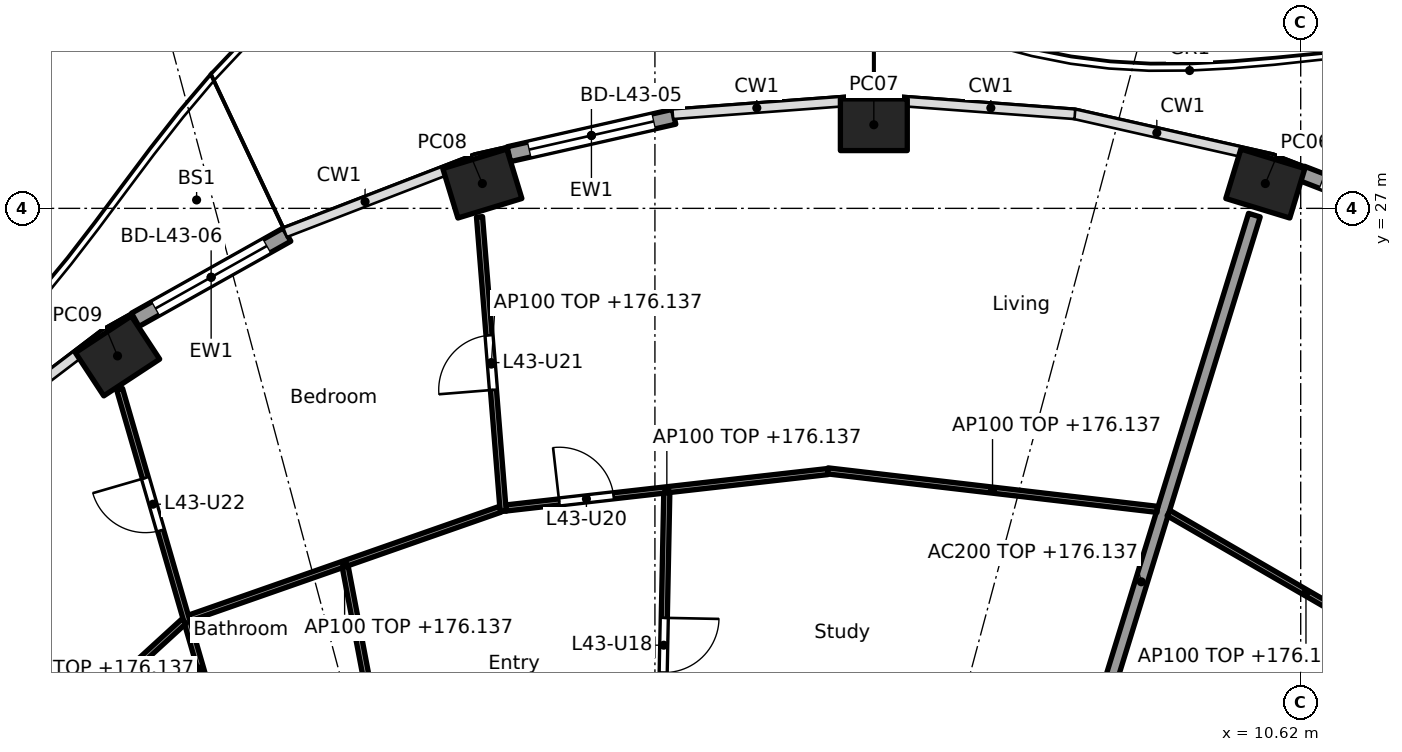
"""IFC4 building model, lengths in metres.
Left out: names, types, materials, properties, quantities, classifications, styles, units other than length and angle.
Written with IfcOpenShell. Run it as: python <this file> out.ifc"""

import sys

from ifc_helpers import new_model, si_unit, direction, frame, frame_2d, origin, origin_2d, place, context, subcontext, project, spatial, rectangle, hollow_rectangle, extrude, element, fill, save


model = new_model("IFC4")
c1 = context("Model", 3, precision=1e-05, world=origin(), true_north=direction((0.0, 1.0)))
c2 = subcontext(c1, "Body", "Model", "MODEL_VIEW")
j1 = project(units=[si_unit("LENGTHUNIT", "METRE"), si_unit("PLANEANGLEUNIT", "RADIAN")], contexts=[c1])
p1 = place(None, origin())
s1 = spatial("IfcSite", under=j1, at=p1, CompositionType="ELEMENT")
p2 = place(p1, origin())
s2 = spatial("IfcBuilding", under=s1, at=p2, CompositionType="ELEMENT")
p3 = place(p2, frame((0.0, 0.0, 173.3)))
s3 = spatial("IfcBuildingStorey", under=s2, at=p3, CompositionType="ELEMENT", Elevation=173.3)
for number, where, z_axis, x_axis in (
    (1, (10.038, 27.408, 0.0), (0.0, 0.0, 1.0), (-0.957, 0.292, 0.0)),
    (2, (3.6, 28.375, 0.0), (0.0, 0.0, 1.0), (-1.0, 0.0, 0.0)),
    (3, (-2.838, 27.408, 0.0), (0.0, 0.0, 1.0), (-0.957, -0.292, 0.0)),
    (4, (-8.837, 24.573, 0.0), (0.0, 0.0, 1.0), (-0.836, -0.549, 0.0)),
):
    element("IfcColumn", number, at=place(p3, frame(where, z_axis=z_axis, x_axis=x_axis)), inside=s3, PredefinedType="COLUMN", context=c2, shape_type="SweptSolid", body=[
        extrude(hollow_rectangle(XDim=1.1, YDim=0.85, WallThickness=0.036, at=origin_2d()), origin(), (0.0, 0.0, 1.0), 3.7),
    ])
p4 = place(p3, frame((10.635, 27.576, 0.0), z_axis=(0.0, 0.0, 1.0), x_axis=(0.932806734513, -0.360377019311, 0.0)))
e5 = element("IfcWall", 5, at=p4, inside=s3, PredefinedType="SOLIDWALL", context=c2, shape_type="SweptSolid", body=[
    extrude(rectangle(XDim=2.82, YDim=0.25, at=frame_2d((1.41, 0.0))), origin(), (0.0, 0.0, 1.0), 3.44),
])
p5 = place(p4, frame((0.36, 0.0, 0.0)))
e6 = element("IfcOpeningElement", 6, at=p5, cuts=e5, PredefinedType="OPENING", context=c2, shape_type="SweptSolid", body=[
    extrude(rectangle(XDim=2.1, YDim=2.4, at=frame_2d((1.05, 1.2))), frame((0.0, 0.135, 0.0), z_axis=(0.0, -1.0, 0.0), x_axis=(1.0, 0.0, 0.0)), (0.0, 0.0, 1.0), 0.27),
])
p6 = place(p3, frame((-2.404, 27.891, 0.0), z_axis=(0.0, 0.0, 1.0), x_axis=(0.975324329911, 0.220776926974, 0.0)))
e7 = element("IfcWall", 7, at=p6, inside=s3, PredefinedType="SOLIDWALL", context=c2, shape_type="SweptSolid", body=[
    extrude(rectangle(XDim=2.788, YDim=0.25, at=frame_2d((1.394, 0.0))), origin(), (0.0, 0.0, 1.0), 3.44),
])
p7 = place(p6, frame((0.344, 0.0, 0.0)))
e8 = element("IfcOpeningElement", 8, at=p7, cuts=e7, PredefinedType="OPENING", context=c2, shape_type="SweptSolid", body=[
    extrude(rectangle(XDim=2.1, YDim=2.4, at=frame_2d((1.05, 1.2))), frame((0.0, 0.135, 0.0), z_axis=(0.0, -1.0, 0.0), x_axis=(1.0, 0.0, 0.0)), (0.0, 0.0, 1.0), 0.27),
])
p8 = place(p3, frame((-8.547, 25.167, 0.0), z_axis=(0.0, 0.0, 1.0), x_axis=(0.872078262455, 0.489366431371, 0.0)))
e9 = element("IfcWall", 9, at=p8, inside=s3, PredefinedType="SOLIDWALL", context=c2, shape_type="SweptSolid", body=[
    extrude(rectangle(XDim=2.864, YDim=0.25, at=frame_2d((1.432, 0.0))), origin(), (0.0, 0.0, 1.0), 3.44),
])
p9 = place(p8, frame((0.382, 0.0, 0.0)))
e10 = element("IfcOpeningElement", 10, at=p9, cuts=e9, PredefinedType="OPENING", context=c2, shape_type="SweptSolid", body=[
    extrude(rectangle(XDim=2.1, YDim=2.4, at=frame_2d((1.05, 1.2))), frame((0.0, 0.135, 0.0), z_axis=(0.0, -1.0, 0.0), x_axis=(1.0, 0.0, 0.0)), (0.0, 0.0, 1.0), 0.27),
])
p10 = place(p3, frame((6.138, 14.83, 0.0), z_axis=(0.0, 0.0, 1.0), x_axis=(0.294818517221, 0.955553264818, 0.0)))
e11 = element("IfcWall", 11, at=p10, inside=s3, PredefinedType="PARTITIONING", context=c2, shape_type="SweptSolid", body=[
    extrude(rectangle(XDim=12.619, YDim=0.2, at=frame_2d((6.31, 0.0))), origin(), (0.0, 0.0, 1.0), 2.837),
])
p11 = place(p3, frame((12.965, 19.371, 0.0), z_axis=(0.0, 0.0, 1.0), x_axis=(-0.865286427811, 0.501277765163, 0.0)))
e12 = element("IfcWall", 12, at=p11, inside=s3, PredefinedType="PARTITIONING", context=c2, shape_type="SweptSolid", body=[
    extrude(rectangle(XDim=5.22, YDim=0.1, at=frame_2d((2.61, 0.0))), origin(), (0.0, 0.0, 1.0), 2.837),
])
p12 = place(p3, frame((8.262, 22.05, 0.0), z_axis=(0.0, 0.0, 1.0), x_axis=(-0.993250089265, 0.115992500516, 0.0)))
e13 = element("IfcWall", 13, at=p12, inside=s3, PredefinedType="PARTITIONING", context=c2, shape_type="SweptSolid", body=[
    extrude(rectangle(XDim=5.458, YDim=0.1, at=frame_2d((2.729, 0.0))), origin(), (0.0, 0.0, 1.0), 2.837),
])
p13 = place(p3, frame((2.842, 22.671, 0.0), z_axis=(0.0, 0.0, 1.0), x_axis=(-0.993660315081, -0.112424099879, 0.0)))
e14 = element("IfcWall", 14, at=p13, inside=s3, PredefinedType="PARTITIONING", context=c2, shape_type="SweptSolid", body=[
    extrude(rectangle(XDim=5.325, YDim=0.1, at=frame_2d((2.662, 0.0))), origin(), (0.0, 0.0, 1.0), 2.837),
])
p14 = place(p13, frame((3.544, 0.0, 0.0)))
e15 = element("IfcOpeningElement", 15, at=p14, cuts=e14, PredefinedType="OPENING", context=c2, shape_type="SweptSolid", body=[
    extrude(rectangle(XDim=0.9, YDim=2.1, at=frame_2d((0.45, 1.05))), frame((0.0, 0.06, 0.0), z_axis=(0.0, -1.0, 0.0), x_axis=(1.0, 0.0, 0.0)), (0.0, 0.0, 1.0), 0.12),
])
p15 = place(p3, frame((0.002, 12.665, 0.0), z_axis=(0.0, 0.0, 1.0), x_axis=(0.019992969345, 0.999800120613, 0.0)))
e16 = element("IfcWall", 16, at=p15, inside=s3, PredefinedType="PARTITIONING", context=c2, shape_type="SweptSolid", body=[
    extrude(rectangle(XDim=9.659, YDim=0.1, at=frame_2d((4.83, 0.0))), origin(), (0.0, 0.0, 1.0), 2.756),
])
p16 = place(p15, frame((1.873, 0.0, 0.0)))
e17 = element("IfcOpeningElement", 17, at=p16, cuts=e16, PredefinedType="OPENING", context=c2, shape_type="SweptSolid", body=[
    extrude(rectangle(XDim=0.9, YDim=2.1, at=frame_2d((0.45, 1.05))), frame((0.0, 0.06, 0.0), z_axis=(0.0, -1.0, 0.0), x_axis=(1.0, 0.0, 0.0)), (0.0, 0.0, 1.0), 0.12),
])
p17 = place(p15, frame((6.703, 0.0, 0.0)))
e18 = element("IfcOpeningElement", 18, at=p17, cuts=e16, PredefinedType="OPENING", context=c2, shape_type="SweptSolid", body=[
    extrude(rectangle(XDim=0.9, YDim=2.1, at=frame_2d((0.45, 1.05))), frame((0.0, 0.06, 0.0), z_axis=(0.0, -1.0, 0.0), x_axis=(1.0, 0.0, 0.0)), (0.0, 0.0, 1.0), 0.12),
])
p18 = place(p3, frame((-2.495, 22.017, 0.0), z_axis=(0.0, 0.0, 1.0), x_axis=(-0.080150660566, 0.99678276049, 0.0)))
e19 = element("IfcWall", 19, at=p18, inside=s3, PredefinedType="PARTITIONING", context=c2, shape_type="SweptSolid", body=[
    extrude(rectangle(XDim=4.858, YDim=0.1, at=frame_2d((2.429, 0.0))), origin(), (0.0, 0.0, 1.0), 2.837),
])
p19 = place(p18, frame((2.004, 0.0, 0.0)))
e20 = element("IfcOpeningElement", 20, at=p19, cuts=e19, PredefinedType="OPENING", context=c2, shape_type="SweptSolid", body=[
    extrude(rectangle(XDim=0.9, YDim=2.1, at=frame_2d((0.45, 1.05))), frame((0.0, 0.06, 0.0), z_axis=(0.0, -1.0, 0.0), x_axis=(1.0, 0.0, 0.0)), (0.0, 0.0, 1.0), 0.12),
])
p20 = place(p3, frame((-2.546, 22.051, 0.0), z_axis=(0.0, 0.0, 1.0), x_axis=(-0.943911038661, -0.330199865375, 0.0)))
e21 = element("IfcWall", 21, at=p20, inside=s3, PredefinedType="PARTITIONING", context=c2, shape_type="SweptSolid", body=[
    extrude(rectangle(XDim=5.417, YDim=0.1, at=frame_2d((2.709, 0.0))), origin(), (0.0, 0.0, 1.0), 2.837),
])
p21 = place(p3, frame((-3.488, 12.663, 0.0), z_axis=(0.0, 0.0, 1.0), x_axis=(-0.186783185485, 0.982401161247, 0.0)))
e22 = element("IfcWall", 22, at=p21, inside=s3, PredefinedType="PARTITIONING", context=c2, shape_type="SweptSolid", body=[
    extrude(rectangle(XDim=8.595, YDim=0.1, at=frame_2d((4.298, 0.0))), origin(), (0.0, 0.0, 1.0), 2.756),
])
p22 = place(p21, frame((0.35, 0.0, 0.0)))
e23 = element("IfcOpeningElement", 23, at=p22, cuts=e22, PredefinedType="OPENING", context=c2, shape_type="SweptSolid", body=[
    extrude(rectangle(XDim=0.9, YDim=2.1, at=frame_2d((0.45, 1.05))), frame((0.0, 0.06, 0.0), z_axis=(0.0, -1.0, 0.0), x_axis=(1.0, 0.0, 0.0)), (0.0, 0.0, 1.0), 0.12),
])
p23 = place(p21, frame((5.908, 0.0, 0.0)))
e24 = element("IfcOpeningElement", 24, at=p23, cuts=e22, PredefinedType="OPENING", context=c2, shape_type="SweptSolid", body=[
    extrude(rectangle(XDim=0.9, YDim=2.1, at=frame_2d((0.45, 1.05))), frame((0.0, 0.06, 0.0), z_axis=(0.0, -1.0, 0.0), x_axis=(1.0, 0.0, 0.0)), (0.0, 0.0, 1.0), 0.12),
])
p24 = place(p3, frame((-6.137, 14.83, 0.0), z_axis=(0.0, 0.0, 1.0), x_axis=(-0.278461169897, 0.96044748782, 0.0)))
e25 = element("IfcWall", 25, at=p24, inside=s3, PredefinedType="PARTITIONING", context=c2, shape_type="SweptSolid", body=[
    extrude(rectangle(XDim=9.573, YDim=0.1, at=frame_2d((4.787, 0.0))), origin(), (0.0, 0.0, 1.0), 2.837),
])
p25 = place(p24, frame((7.156, 0.0, 0.0)))
e26 = element("IfcOpeningElement", 26, at=p25, cuts=e25, PredefinedType="OPENING", context=c2, shape_type="SweptSolid", body=[
    extrude(rectangle(XDim=0.9, YDim=2.1, at=frame_2d((0.45, 1.05))), frame((0.0, 0.06, 0.0), z_axis=(0.0, -1.0, 0.0), x_axis=(1.0, 0.0, 0.0)), (0.0, 0.0, 1.0), 0.12),
])
p26 = place(p3, frame((-7.744, 20.212, 0.0), z_axis=(0.0, 0.0, 1.0), x_axis=(-0.738051761282, -0.674744097913, 0.0)))
e27 = element("IfcWall", 27, at=p26, inside=s3, PredefinedType="PARTITIONING", context=c2, shape_type="SweptSolid", body=[
    extrude(rectangle(XDim=5.449, YDim=0.1, at=frame_2d((2.725, 0.0))), origin(), (0.0, 0.0, 1.0), 2.837),
])
p27 = place(p5, origin())
e28 = element("IfcDoor", 28, at=p27, inside=s3, OperationType="SLIDING_TO_LEFT", PredefinedType="DOOR", context=c2, shape_type="SweptSolid", body=[
    extrude(rectangle(XDim=2.1, YDim=2.4, at=frame_2d((1.05, 1.2))), frame((0.0, 0.025, 0.0), z_axis=(0.0, -1.0, 0.0), x_axis=(1.0, 0.0, 0.0)), (0.0, 0.0, 1.0), 0.05),
])
fill(e6, e28)
p28 = place(p7, origin())
e29 = element("IfcDoor", 29, at=p28, inside=s3, OperationType="SLIDING_TO_LEFT", PredefinedType="DOOR", context=c2, shape_type="SweptSolid", body=[
    extrude(rectangle(XDim=2.1, YDim=2.4, at=frame_2d((1.05, 1.2))), frame((0.0, 0.025, 0.0), z_axis=(0.0, -1.0, 0.0), x_axis=(1.0, 0.0, 0.0)), (0.0, 0.0, 1.0), 0.05),
])
fill(e8, e29)
p29 = place(p9, origin())
e30 = element("IfcDoor", 30, at=p29, inside=s3, OperationType="SLIDING_TO_LEFT", PredefinedType="DOOR", context=c2, shape_type="SweptSolid", body=[
    extrude(rectangle(XDim=2.1, YDim=2.4, at=frame_2d((1.05, 1.2))), frame((0.0, 0.025, 0.0), z_axis=(0.0, -1.0, 0.0), x_axis=(1.0, 0.0, 0.0)), (0.0, 0.0, 1.0), 0.05),
])
fill(e10, e30)
p30 = place(p17, frame((0.9, 0.0, 0.0), x_axis=(-1.0, 0.0, 0.0)))
e31 = element("IfcDoor", 31, at=p30, inside=s3, OperationType="SINGLE_SWING_LEFT", PredefinedType="DOOR", context=c2, shape_type="SweptSolid", body=[
    extrude(rectangle(XDim=0.9, YDim=2.1, at=frame_2d((0.45, 1.05))), frame((0.0, 0.025, 0.0), z_axis=(0.0, -1.0, 0.0), x_axis=(1.0, 0.0, 0.0)), (0.0, 0.0, 1.0), 0.05),
])
fill(e18, e31)
p31 = place(p14, frame((0.9, 0.0, 0.0), x_axis=(-1.0, 0.0, 0.0)))
e32 = element("IfcDoor", 32, at=p31, inside=s3, OperationType="SINGLE_SWING_LEFT", PredefinedType="DOOR", context=c2, shape_type="SweptSolid", body=[
    extrude(rectangle(XDim=0.9, YDim=2.1, at=frame_2d((0.45, 1.05))), frame((0.0, 0.025, 0.0), z_axis=(0.0, -1.0, 0.0), x_axis=(1.0, 0.0, 0.0)), (0.0, 0.0, 1.0), 0.05),
])
fill(e15, e32)
p32 = place(p19, origin())
e33 = element("IfcDoor", 33, at=p32, inside=s3, OperationType="SINGLE_SWING_LEFT", PredefinedType="DOOR", context=c2, shape_type="SweptSolid", body=[
    extrude(rectangle(XDim=0.9, YDim=2.1, at=frame_2d((0.45, 1.05))), frame((0.0, 0.025, 0.0), z_axis=(0.0, -1.0, 0.0), x_axis=(1.0, 0.0, 0.0)), (0.0, 0.0, 1.0), 0.05),
])
fill(e20, e33)
p33 = place(p25, origin())
e34 = element("IfcDoor", 34, at=p33, inside=s3, OperationType="SINGLE_SWING_RIGHT", PredefinedType="DOOR", context=c2, shape_type="SweptSolid", body=[
    extrude(rectangle(XDim=0.9, YDim=2.1, at=frame_2d((0.45, 1.05))), frame((0.0, 0.025, 0.0), z_axis=(0.0, -1.0, 0.0), x_axis=(1.0, 0.0, 0.0)), (0.0, 0.0, 1.0), 0.05),
])
fill(e26, e34)
save(model, sys.argv[1])
